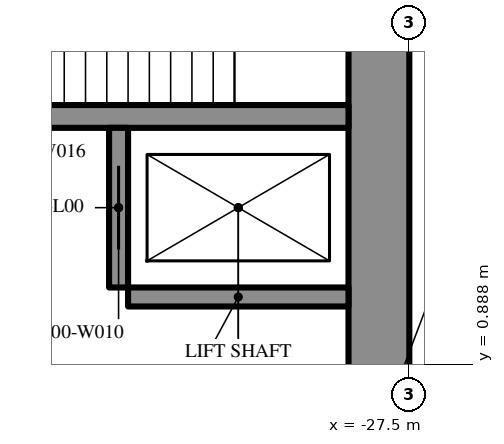
"""IFC4 building model, lengths in metres.
Left out: names, types, materials, properties, quantities, classifications, styles, units other than length and angle.
Written with IfcOpenShell. Run it as: python <this file> out.ifc"""

import sys

from ifc_helpers import new_model, si_unit, direction, frame, frame_2d, origin, place, context, subcontext, project, spatial, rectangle, extrude, element, fill, save


model = new_model("IFC4")
c1 = context("Model", 3, precision=1e-05, world=origin(), true_north=direction((0.0, 1.0)))
c2 = subcontext(c1, "Body", "Model", "MODEL_VIEW")
j1 = project(units=[si_unit("LENGTHUNIT", "METRE"), si_unit("PLANEANGLEUNIT", "RADIAN")], contexts=[c1])
p1 = place(None, origin())
s1 = spatial("IfcSite", under=j1, at=p1, CompositionType="ELEMENT")
p2 = place(p1, origin())
s2 = spatial("IfcBuilding", under=s1, at=p2, CompositionType="ELEMENT")
p3 = place(p2, origin())
s3 = spatial("IfcBuildingStorey", under=s2, at=p3, CompositionType="ELEMENT", Elevation=0.0)
p4 = place(p3, frame((-27.9, 8.6, 0.0), z_axis=(0.0, 0.0, 1.0), x_axis=(0.0, -1.0, 0.0)))
e1 = element("IfcWall", 1, at=p4, inside=s3, PredefinedType="SHEAR", context=c2, shape_type="SweptSolid", body=[
    extrude(rectangle(XDim=17.2, YDim=0.8, at=frame_2d((8.6, 0.0))), origin(), (0.0, 0.0, 1.0), 7.2),
])
p5 = place(p3, frame((-28.3, 4.15, 0.0), z_axis=(0.0, 0.0, 1.0), x_axis=(-1.0, 0.0, 0.0)))
e2 = element("IfcWall", 2, at=p5, inside=s3, PredefinedType="SHEAR", context=c2, shape_type="SweptSolid", body=[
    extrude(rectangle(XDim=8.4, YDim=0.3, at=frame_2d((4.2, 0.0))), origin(), (0.0, 0.0, 1.0), 7.2),
])
p6 = place(p3, frame((-31.325, 4.0, 0.0), z_axis=(0.0, 0.0, 1.0), x_axis=(0.0, -1.0, 0.0)))
e3 = element("IfcWall", 3, at=p6, inside=s3, PredefinedType="SHEAR", context=c2, shape_type="SweptSolid", body=[
    extrude(rectangle(XDim=2.1, YDim=0.25, at=frame_2d((1.05, 0.0))), origin(), (0.0, 0.0, 1.0), 7.2),
])
p7 = place(p6, frame((0.5, 0.0, 0.0)))
e4 = element("IfcOpeningElement", 4, at=p7, cuts=e3, PredefinedType="OPENING", context=c2, shape_type="SweptSolid", body=[
    extrude(rectangle(XDim=1.1, YDim=2.2, at=frame_2d((0.55, 1.1))), frame((0.0, 0.135, 0.0), z_axis=(0.0, -1.0, 0.0), x_axis=(1.0, 0.0, 0.0)), (0.0, 0.0, 1.0), 0.27),
])
p8 = place(p3, frame((-28.3, 1.775, 0.0), z_axis=(0.0, 0.0, 1.0), x_axis=(-1.0, 0.0, 0.0)))
e5 = element("IfcWall", 5, at=p8, inside=s3, PredefinedType="SHEAR", context=c2, shape_type="SweptSolid", body=[
    extrude(rectangle(XDim=2.9, YDim=0.25, at=frame_2d((1.45, 0.0))), origin(), (0.0, 0.0, 1.0), 7.2),
])
p9 = place(p3, frame((-27.2, 14.3, 0.0), z_axis=(0.0, 0.0, 1.0), x_axis=(-0.866026593062, -0.499997940104, 0.0)))
e6 = element("IfcWall", 6, at=p9, inside=s3, PredefinedType="SHEAR", context=c2, shape_type="SweptSolid", body=[
    extrude(rectangle(XDim=28.946, YDim=2.0, at=frame_2d((14.473, 0.0))), origin(), (0.0, 0.0, 1.0), 7.2),
])
p10 = place(p9, frame((4.6, 0.0, 0.0)))
e7 = element("IfcOpeningElement", 7, at=p10, cuts=e6, PredefinedType="OPENING", context=c2, shape_type="SweptSolid", body=[
    extrude(rectangle(XDim=1.0, YDim=2.2, at=frame_2d((0.5, 1.1))), frame((0.0, 1.01, 0.0), z_axis=(0.0, -1.0, 0.0), x_axis=(1.0, 0.0, 0.0)), (0.0, 0.0, 1.0), 2.02),
])
p11 = place(p9, frame((13.395, 0.0, 0.0)))
e8 = element("IfcOpeningElement", 8, at=p11, cuts=e6, PredefinedType="OPENING", context=c2, shape_type="SweptSolid", body=[
    extrude(rectangle(XDim=1.8, YDim=2.2, at=frame_2d((0.9, 1.1))), frame((0.0, 1.01, 0.0), z_axis=(0.0, -1.0, 0.0), x_axis=(1.0, 0.0, 0.0)), (0.0, 0.0, 1.0), 2.02),
])
p12 = place(p7, origin())
e9 = element("IfcDoor", 9, at=p12, inside=s3, OperationType="SLIDING_TO_LEFT", PredefinedType="USERDEFINED", context=c2, shape_type="SweptSolid", body=[
    extrude(rectangle(XDim=1.1, YDim=2.2, at=frame_2d((0.55, 1.1))), frame((0.0, 0.025, 0.0), z_axis=(0.0, -1.0, 0.0), x_axis=(1.0, 0.0, 0.0)), (0.0, 0.0, 1.0), 0.05),
])
fill(e4, e9)
save(model, sys.argv[1])
